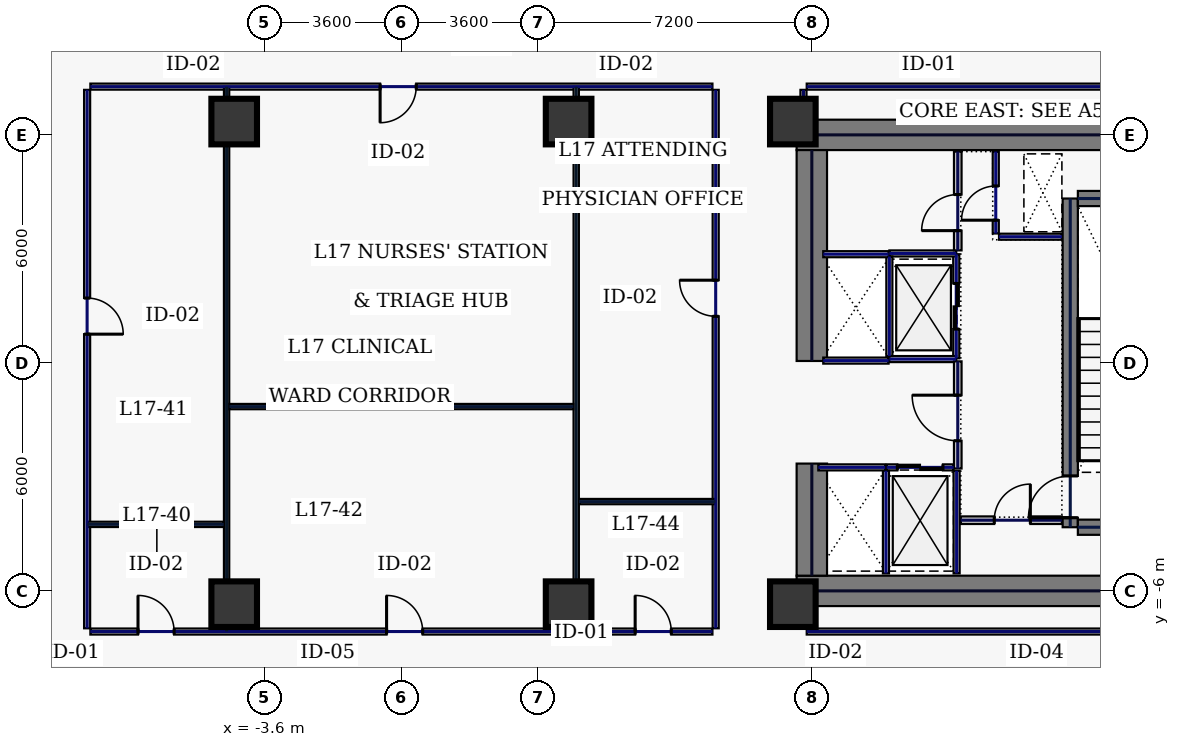
"""IFC4 building model, lengths in metres.
Left out: names, types, materials, properties, quantities, classifications, styles, units other than length and angle.
Written with IfcOpenShell. Run it as: python <this file> out.ifc"""

import sys

from ifc_helpers import new_model, si_unit, direction, frame, frame_2d, origin, origin_2d, place, context, subcontext, project, spatial, rectangle, hollow_rectangle, extrude, element, fill, save


model = new_model("IFC4")
c1 = context("Model", 3, precision=1e-05, world=origin(), true_north=direction((0.0, 1.0)))
c2 = subcontext(c1, "Body", "Model", "MODEL_VIEW")
j1 = project(units=[si_unit("LENGTHUNIT", "METRE"), si_unit("PLANEANGLEUNIT", "RADIAN")], contexts=[c1])
p1 = place(None, origin())
s1 = spatial("IfcSite", under=j1, at=p1, CompositionType="ELEMENT")
p2 = place(p1, origin())
s2 = spatial("IfcBuilding", under=s1, at=p2, CompositionType="ELEMENT")
p3 = place(p2, frame((0.0, 0.0, 79.4)))
s3 = spatial("IfcBuildingStorey", under=s2, at=p3, CompositionType="ELEMENT", Elevation=79.4)
for number, where, z_axis, x_axis in (
    (1, (10.4, 6.0, 0.0), (0.0, 0.0, 1.0), (1.0, 0.0, 0.0)),
    (2, (10.4, -6.0, 0.0), (0.0, 0.0, 1.0), (1.0, 0.0, 0.0)),
):
    element("IfcWall", number, at=place(p3, frame(where, z_axis=z_axis, x_axis=x_axis)), inside=s3, PredefinedType="SHEAR", context=c2, shape_type="SweptSolid", body=[
        extrude(rectangle(XDim=11.6, YDim=0.8, at=frame_2d((5.8, 0.0))), origin(), (0.0, 0.0, 1.0), 3.68),
    ])
p4 = place(p3, frame((10.8, -5.6, 0.0), z_axis=(0.0, 0.0, 1.0), x_axis=(0.0, 1.0, 0.0)))
e3 = element("IfcWall", 3, at=p4, inside=s3, PredefinedType="SHEAR", context=c2, shape_type="SweptSolid", body=[
    extrude(rectangle(XDim=2.95, YDim=0.8, at=frame_2d((1.475, 0.0))), origin(), (0.0, 0.0, 1.0), 3.68),
])
p5 = place(p3, frame((10.8, 0.05, 0.0), z_axis=(0.0, 0.0, 1.0), x_axis=(0.0, 1.0, 0.0)))
e4 = element("IfcWall", 4, at=p5, inside=s3, PredefinedType="SHEAR", context=c2, shape_type="SweptSolid", body=[
    extrude(rectangle(XDim=5.55, YDim=0.8, at=frame_2d((2.775, 0.0))), origin(), (0.0, 0.0, 1.0), 3.68),
])
p6 = place(p3, frame((17.6, -4.325, 0.0), z_axis=(0.0, 0.0, 1.0), x_axis=(0.0, 1.0, 0.0)))
e5 = element("IfcWall", 5, at=p6, inside=s3, PredefinedType="SHEAR", context=c2, shape_type="SweptSolid", body=[
    extrude(rectangle(XDim=8.65, YDim=0.4, at=frame_2d((4.325, 0.0))), origin(), (0.0, 0.0, 1.0), 3.68),
])
p7 = place(p6, frame((0.25, 0.0, 0.0)))
e6 = element("IfcOpeningElement", 6, at=p7, cuts=e5, PredefinedType="OPENING", context=c2, shape_type="SweptSolid", body=[
    extrude(rectangle(XDim=1.1, YDim=2.2, at=frame_2d((0.55, 1.1))), frame((0.0, 0.21, 0.0), z_axis=(0.0, -1.0, 0.0), x_axis=(1.0, 0.0, 0.0)), (0.0, 0.0, 1.0), 0.42),
])
for number, where, z_axis, x_axis in (
    (7, (17.8, -4.325, 0.0), (0.0, 0.0, 1.0), (1.0, 0.0, 0.0)),
    (8, (17.8, 4.325, 0.0), (0.0, 0.0, 1.0), (1.0, 0.0, 0.0)),
):
    element("IfcWall", number, at=place(p3, frame(where, z_axis=z_axis, x_axis=x_axis)), inside=s3, PredefinedType="SHEAR", context=c2, shape_type="SweptSolid", body=[
        extrude(rectangle(XDim=3.4, YDim=0.4, at=frame_2d((1.7, 0.0))), origin(), (0.0, 0.0, 1.0), 3.68),
    ])
for number, where, z_axis, x_axis in (
    (9, (10.3, -6.35, 0.0), (0.0, 0.0, 1.0), (1.0, 0.0, 0.0)),
    (10, (10.3, 6.35, 0.0), (0.0, 0.0, 1.0), (1.0, 0.0, 0.0)),
    (11, (-4.4, -6.35, 0.0), (0.0, 0.0, 1.0), (1.0, 0.0, 0.0)),
    (12, (4.4, -6.35, 0.0), (0.0, 0.0, 1.0), (1.0, 0.0, 0.0)),
    (13, (-4.4, 6.35, 0.0), (0.0, 0.0, 1.0), (1.0, 0.0, 0.0)),
    (14, (4.4, 6.35, 0.0), (0.0, 0.0, 1.0), (1.0, 0.0, 0.0)),
):
    element("IfcColumn", number, at=place(p3, frame(where, z_axis=z_axis, x_axis=x_axis)), inside=s3, PredefinedType="COLUMN", context=c2, shape_type="SweptSolid", body=[
        extrude(hollow_rectangle(XDim=1.2, YDim=1.2, WallThickness=0.05, at=origin_2d()), origin(), (0.0, 0.0, 1.0), 3.68),
    ])
p8 = place(p3, frame((14.6, 0.12, 0.0), z_axis=(0.0, 0.0, 1.0), x_axis=(0.0, 1.0, 0.0)))
e15 = element("IfcWall", 15, at=p8, inside=s3, PredefinedType="PARTITIONING", context=c2, shape_type="SweptSolid", body=[
    extrude(rectangle(XDim=2.74, YDim=0.16, at=frame_2d((1.37, 0.0))), origin(), (0.0, 0.0, 1.0), 3.68),
])
p9 = place(p8, frame((0.77, 0.0, 0.0)))
e16 = element("IfcOpeningElement", 16, at=p9, cuts=e15, PredefinedType="OPENING", context=c2, shape_type="SweptSolid", body=[
    extrude(rectangle(XDim=1.2, YDim=2.2, at=frame_2d((0.6, 1.1))), frame((0.0, 0.09, 0.0), z_axis=(0.0, -1.0, 0.0), x_axis=(1.0, 0.0, 0.0)), (0.0, 0.0, 1.0), 0.18),
])
for number, where, z_axis, x_axis in (
    (17, (12.84, 0.1, 0.0), (0.0, 0.0, 1.0), (1.0, 0.0, 0.0)),
    (18, (12.84, 2.88, 0.0), (0.0, 0.0, 1.0), (1.0, 0.0, 0.0)),
):
    element("IfcWall", number, at=place(p3, frame(where, z_axis=z_axis, x_axis=x_axis)), inside=s3, PredefinedType="PARTITIONING", context=c2, shape_type="SweptSolid", body=[
        extrude(rectangle(XDim=1.76, YDim=0.16, at=frame_2d((0.88, 0.0))), origin(), (0.0, 0.0, 1.0), 3.68),
    ])
p10 = place(p3, frame((12.84, 0.18, 0.0), z_axis=(0.0, 0.0, 1.0), x_axis=(0.0, 1.0, 0.0)))
e19 = element("IfcWall", 19, at=p10, inside=s3, PredefinedType="PARTITIONING", context=c2, shape_type="SweptSolid", body=[
    extrude(rectangle(XDim=2.62, YDim=0.16, at=frame_2d((1.31, 0.0))), origin(), (0.0, 0.0, 1.0), 3.68),
])
p11 = place(p3, frame((12.77, -2.75, 0.0), z_axis=(0.0, 0.0, 1.0), x_axis=(1.0, 0.0, 0.0)))
e20 = element("IfcWall", 20, at=p11, inside=s3, PredefinedType="PARTITIONING", context=c2, shape_type="SweptSolid", body=[
    extrude(rectangle(XDim=1.76, YDim=0.16, at=frame_2d((0.88, 0.0))), origin(), (0.0, 0.0, 1.0), 3.68),
])
p12 = place(p11, frame((0.28, 0.0, 0.0)))
e21 = element("IfcOpeningElement", 21, at=p12, cuts=e20, PredefinedType="OPENING", context=c2, shape_type="SweptSolid", body=[
    extrude(rectangle(XDim=1.2, YDim=2.2, at=frame_2d((0.6, 1.1))), frame((0.0, 0.09, 0.0), z_axis=(0.0, -1.0, 0.0), x_axis=(1.0, 0.0, 0.0)), (0.0, 0.0, 1.0), 0.18),
])
for number, where, z_axis, x_axis in (
    (22, (12.75, -5.54, 0.0), (0.0, 0.0, 1.0), (0.0, 1.0, 0.0)),
    (23, (14.61, -5.54, 0.0), (0.0, 0.0, 1.0), (0.0, 1.0, 0.0)),
):
    element("IfcWall", number, at=place(p3, frame(where, z_axis=z_axis, x_axis=x_axis)), inside=s3, PredefinedType="PARTITIONING", context=c2, shape_type="SweptSolid", body=[
        extrude(rectangle(XDim=2.7, YDim=0.16, at=frame_2d((1.35, 0.0))), origin(), (0.0, 0.0, 1.0), 3.68),
    ])
p13 = place(p3, frame((10.97, -2.75, 0.0), z_axis=(0.0, 0.0, 1.0), x_axis=(1.0, 0.0, 0.0)))
e24 = element("IfcWall", 24, at=p13, inside=s3, PredefinedType="PARTITIONING", context=c2, shape_type="SweptSolid", body=[
    extrude(rectangle(XDim=1.76, YDim=0.16, at=frame_2d((0.88, 0.0))), origin(), (0.0, 0.0, 1.0), 3.68),
])
for number, where, z_axis, x_axis in (
    (25, (11.1, 0.06, 0.0), (0.0, 0.0, 1.0), (1.0, 0.0, 0.0)),
    (26, (11.1, 2.86, 0.0), (0.0, 0.0, 1.0), (1.0, 0.0, 0.0)),
):
    element("IfcWall", number, at=place(p3, frame(where, z_axis=z_axis, x_axis=x_axis)), inside=s3, PredefinedType="PARTITIONING", context=c2, shape_type="SweptSolid", body=[
        extrude(rectangle(XDim=1.72, YDim=0.16, at=frame_2d((0.86, 0.0))), origin(), (0.0, 0.0, 1.0), 3.68),
    ])
p14 = place(p3, frame((15.64, 3.405, 0.0), z_axis=(0.0, 0.0, 1.0), x_axis=(0.0, 1.0, 0.0)))
e27 = element("IfcWall", 27, at=p14, inside=s3, PredefinedType="PARTITIONING", context=c2, shape_type="SweptSolid", body=[
    extrude(rectangle(XDim=2.155, YDim=0.16, at=frame_2d((1.078, 0.0))), origin(), (0.0, 0.0, 1.0), 3.68),
])
p15 = place(p14, frame((0.35, 0.0, 0.0)))
e28 = element("IfcOpeningElement", 28, at=p15, cuts=e27, PredefinedType="OPENING", context=c2, shape_type="SweptSolid", body=[
    extrude(rectangle(XDim=0.9, YDim=2.2, at=frame_2d((0.45, 1.1))), frame((0.0, 0.09, 0.0), z_axis=(0.0, -1.0, 0.0), x_axis=(1.0, 0.0, 0.0)), (0.0, 0.0, 1.0), 0.18),
])
p16 = place(p3, frame((15.725, 3.32, 0.0), z_axis=(0.0, 0.0, 1.0), x_axis=(1.0, 0.0, 0.0)))
e29 = element("IfcWall", 29, at=p16, inside=s3, PredefinedType="PARTITIONING", context=c2, shape_type="SweptSolid", body=[
    extrude(rectangle(XDim=1.655, YDim=0.16, at=frame_2d((0.827, 0.0))), origin(), (0.0, 0.0, 1.0), 3.68),
])
p17 = place(p3, frame((14.72, -4.14, 0.0), z_axis=(0.0, 0.0, 1.0), x_axis=(1.0, 0.0, 0.0)))
e30 = element("IfcWall", 30, at=p17, inside=s3, PredefinedType="SOLIDWALL", context=c2, shape_type="SweptSolid", body=[
    extrude(rectangle(XDim=2.66, YDim=0.2, at=frame_2d((1.33, 0.0))), origin(), (0.0, 0.0, 1.0), 3.68),
])
p18 = place(p17, frame((0.88, 0.0, 0.0)))
e31 = element("IfcOpeningElement", 31, at=p18, cuts=e30, PredefinedType="OPENING", context=c2, shape_type="SweptSolid", body=[
    extrude(rectangle(XDim=0.95, YDim=2.2, at=frame_2d((0.475, 1.1))), frame((0.0, 0.11, 0.0), z_axis=(0.0, -1.0, 0.0), x_axis=(1.0, 0.0, 0.0)), (0.0, 0.0, 1.0), 0.22),
])
p19 = place(p3, frame((14.64, 2.96, 0.0), z_axis=(0.0, 0.0, 1.0), x_axis=(0.0, 1.0, 0.0)))
e32 = element("IfcWall", 32, at=p19, inside=s3, PredefinedType="SOLIDWALL", context=c2, shape_type="SweptSolid", body=[
    extrude(rectangle(XDim=2.6, YDim=0.2, at=frame_2d((1.3, 0.0))), origin(), (0.0, 0.0, 1.0), 3.68),
])
p20 = place(p19, frame((0.52, 0.0, 0.0)))
e33 = element("IfcOpeningElement", 33, at=p20, cuts=e32, PredefinedType="OPENING", context=c2, shape_type="SweptSolid", body=[
    extrude(rectangle(XDim=0.95, YDim=2.2, at=frame_2d((0.475, 1.1))), frame((0.0, 0.11, 0.0), z_axis=(0.0, -1.0, 0.0), x_axis=(1.0, 0.0, 0.0)), (0.0, 0.0, 1.0), 0.22),
])
p21 = place(p3, frame((14.64, -2.78, 0.0), z_axis=(0.0, 0.0, 1.0), x_axis=(0.0, 1.0, 0.0)))
e34 = element("IfcWall", 34, at=p21, inside=s3, PredefinedType="SOLIDWALL", context=c2, shape_type="SweptSolid", body=[
    extrude(rectangle(XDim=2.82, YDim=0.2, at=frame_2d((1.41, 0.0))), origin(), (0.0, 0.0, 1.0), 3.68),
])
p22 = place(p21, frame((0.73, 0.0, 0.0)))
e35 = element("IfcOpeningElement", 35, at=p22, cuts=e34, PredefinedType="OPENING", context=c2, shape_type="SweptSolid", body=[
    extrude(rectangle(XDim=1.2, YDim=2.2, at=frame_2d((0.6, 1.1))), frame((0.0, 0.11, 0.0), z_axis=(0.0, -1.0, 0.0), x_axis=(1.0, 0.0, 0.0)), (0.0, 0.0, 1.0), 0.22),
])
p23 = place(p3, frame((27.185, 7.27, 0.0), z_axis=(0.0, 0.0, 1.0), x_axis=(-1.0, 0.0, 0.0)))
e36 = element("IfcWall", 36, at=p23, inside=s3, PredefinedType="PARTITIONING", context=c2, shape_type="SweptSolid", body=[
    extrude(rectangle(XDim=16.52, YDim=0.16, at=frame_2d((8.26, 0.0))), origin(), (0.0, 0.0, 1.0), 3.68),
])
p24 = place(p3, frame((10.58, 7.185, 0.0), z_axis=(0.0, 0.0, 1.0), x_axis=(0.0, -1.0, 0.0)))
e37 = element("IfcWall", 37, at=p24, inside=s3, PredefinedType="PARTITIONING", context=c2, shape_type="SweptSolid", body=[
    extrude(rectangle(XDim=0.765, YDim=0.16, at=frame_2d((0.383, 0.0))), origin(), (0.0, 0.0, 1.0), 1.475),
])
p25 = place(p3, frame((10.58, -6.42, 0.0), z_axis=(0.0, 0.0, 1.0), x_axis=(0.0, -1.0, 0.0)))
e38 = element("IfcWall", 38, at=p25, inside=s3, PredefinedType="PARTITIONING", context=c2, shape_type="SweptSolid", body=[
    extrude(rectangle(XDim=0.565, YDim=0.16, at=frame_2d((0.283, 0.0))), origin(), (0.0, 0.0, 1.0), 3.68),
])
p26 = place(p3, frame((10.665, -7.07, 0.0), z_axis=(0.0, 0.0, 1.0), x_axis=(1.0, 0.0, 0.0)))
e39 = element("IfcWall", 39, at=p26, inside=s3, PredefinedType="PARTITIONING", context=c2, shape_type="SweptSolid", body=[
    extrude(rectangle(XDim=16.52, YDim=0.16, at=frame_2d((8.26, 0.0))), origin(), (0.0, 0.0, 1.0), 3.68),
])
p27 = place(p3, frame((8.27, -6.985, 0.0), z_axis=(0.0, 0.0, 1.0), x_axis=(0.0, 1.0, 0.0)))
e40 = element("IfcWall", 40, at=p27, inside=s3, PredefinedType="PARTITIONING", context=c2, shape_type="SweptSolid", body=[
    extrude(rectangle(XDim=14.17, YDim=0.16, at=frame_2d((7.085, 0.0))), origin(), (0.0, 0.0, 1.0), 3.68),
])
p28 = place(p27, frame((8.211, 0.0, 0.0)))
e41 = element("IfcOpeningElement", 41, at=p28, cuts=e40, PredefinedType="OPENING", context=c2, shape_type="SweptSolid", body=[
    extrude(rectangle(XDim=0.95, YDim=2.2, at=frame_2d((0.475, 1.1))), frame((0.0, 0.09, 0.0), z_axis=(0.0, -1.0, 0.0), x_axis=(1.0, 0.0, 0.0)), (0.0, 0.0, 1.0), 0.18),
])
p29 = place(p3, frame((8.185, 7.27, 0.0), z_axis=(0.0, 0.0, 1.0), x_axis=(-1.0, 0.0, 0.0)))
e42 = element("IfcWall", 42, at=p29, inside=s3, PredefinedType="PARTITIONING", context=c2, shape_type="SweptSolid", body=[
    extrude(rectangle(XDim=16.37, YDim=0.16, at=frame_2d((8.185, 0.0))), origin(), (0.0, 0.0, 1.0), 3.68),
])
p30 = place(p29, frame((7.795, 0.0, 0.0)))
e43 = element("IfcOpeningElement", 43, at=p30, cuts=e42, PredefinedType="OPENING", context=c2, shape_type="SweptSolid", body=[
    extrude(rectangle(XDim=0.95, YDim=2.2, at=frame_2d((0.475, 1.1))), frame((0.0, 0.09, 0.0), z_axis=(0.0, -1.0, 0.0), x_axis=(1.0, 0.0, 0.0)), (0.0, 0.0, 1.0), 0.18),
])
p31 = place(p3, frame((-8.27, 7.185, 0.0), z_axis=(0.0, 0.0, 1.0), x_axis=(0.0, -1.0, 0.0)))
e44 = element("IfcWall", 44, at=p31, inside=s3, PredefinedType="PARTITIONING", context=c2, shape_type="SweptSolid", body=[
    extrude(rectangle(XDim=14.17, YDim=0.16, at=frame_2d((7.085, 0.0))), origin(), (0.0, 0.0, 1.0), 3.68),
])
p32 = place(p31, frame((5.479, 0.0, 0.0)))
e45 = element("IfcOpeningElement", 45, at=p32, cuts=e44, PredefinedType="OPENING", context=c2, shape_type="SweptSolid", body=[
    extrude(rectangle(XDim=0.95, YDim=2.2, at=frame_2d((0.475, 1.1))), frame((0.0, 0.09, 0.0), z_axis=(0.0, -1.0, 0.0), x_axis=(1.0, 0.0, 0.0)), (0.0, 0.0, 1.0), 0.18),
])
p33 = place(p3, frame((-8.185, -7.07, 0.0), z_axis=(0.0, 0.0, 1.0), x_axis=(1.0, 0.0, 0.0)))
e46 = element("IfcWall", 46, at=p33, inside=s3, PredefinedType="PARTITIONING", context=c2, shape_type="SweptSolid", body=[
    extrude(rectangle(XDim=16.37, YDim=0.16, at=frame_2d((8.185, 0.0))), origin(), (0.0, 0.0, 1.0), 3.68),
])
p34 = place(p33, frame((1.254, 0.0, 0.0)))
e47 = element("IfcOpeningElement", 47, at=p34, cuts=e46, PredefinedType="OPENING", context=c2, shape_type="SweptSolid", body=[
    extrude(rectangle(XDim=0.95, YDim=2.2, at=frame_2d((0.475, 1.1))), frame((0.0, 0.09, 0.0), z_axis=(0.0, -1.0, 0.0), x_axis=(1.0, 0.0, 0.0)), (0.0, 0.0, 1.0), 0.18),
])
p35 = place(p33, frame((7.795, 0.0, 0.0)))
e48 = element("IfcOpeningElement", 48, at=p35, cuts=e46, PredefinedType="OPENING", context=c2, shape_type="SweptSolid", body=[
    extrude(rectangle(XDim=0.95, YDim=2.2, at=frame_2d((0.475, 1.1))), frame((0.0, 0.09, 0.0), z_axis=(0.0, -1.0, 0.0), x_axis=(1.0, 0.0, 0.0)), (0.0, 0.0, 1.0), 0.18),
])
p36 = place(p33, frame((14.336, 0.0, 0.0)))
e49 = element("IfcOpeningElement", 49, at=p36, cuts=e46, PredefinedType="OPENING", context=c2, shape_type="SweptSolid", body=[
    extrude(rectangle(XDim=0.95, YDim=2.2, at=frame_2d((0.475, 1.1))), frame((0.0, 0.09, 0.0), z_axis=(0.0, -1.0, 0.0), x_axis=(1.0, 0.0, 0.0)), (0.0, 0.0, 1.0), 0.18),
])
for number, where, z_axis, x_axis in (
    (50, (-4.6, -7.065, 0.0), (0.0, 0.0, 1.0), (0.0, 1.0, 0.0)),
    (51, (4.6, -7.065, 0.0), (0.0, 0.0, 1.0), (0.0, 1.0, 0.0)),
):
    element("IfcWall", number, at=place(p3, frame(where, z_axis=z_axis, x_axis=x_axis)), inside=s3, PredefinedType="PARTITIONING", context=c2, shape_type="SweptSolid", body=[
        extrude(rectangle(XDim=14.33, YDim=0.14, at=frame_2d((7.165, 0.0))), origin(), (0.0, 0.0, 1.0), 1.475),
    ])
p37 = place(p3, frame((-4.525, -1.15, 0.0), z_axis=(0.0, 0.0, 1.0), x_axis=(1.0, 0.0, 0.0)))
e52 = element("IfcWall", 52, at=p37, inside=s3, PredefinedType="PARTITIONING", context=c2, shape_type="SweptSolid", body=[
    extrude(rectangle(XDim=9.05, YDim=0.14, at=frame_2d((4.525, 0.0))), origin(), (0.0, 0.0, 1.0), 3.68),
])
for number, where, z_axis, x_axis in (
    (53, (-8.265, -4.25, 0.0), (0.0, 0.0, 1.0), (1.0, 0.0, 0.0)),
    (54, (4.675, -3.65, 0.0), (0.0, 0.0, 1.0), (1.0, 0.0, 0.0)),
):
    element("IfcWall", number, at=place(p3, frame(where, z_axis=z_axis, x_axis=x_axis)), inside=s3, PredefinedType="PARTITIONING", context=c2, shape_type="SweptSolid", body=[
        extrude(rectangle(XDim=3.59, YDim=0.14, at=frame_2d((1.795, 0.0))), origin(), (0.0, 0.0, 1.0), 3.68),
    ])
p38 = place(p7, origin())
e55 = element("IfcDoor", 55, at=p38, inside=s3, OperationType="SINGLE_SWING_LEFT", PredefinedType="DOOR", context=c2, shape_type="SweptSolid", body=[
    extrude(rectangle(XDim=1.1, YDim=2.2, at=frame_2d((0.55, 1.1))), frame((0.0, 0.025, 0.0), z_axis=(0.0, -1.0, 0.0), x_axis=(1.0, 0.0, 0.0)), (0.0, 0.0, 1.0), 0.05),
])
fill(e6, e55)
p39 = place(p9, origin())
e56 = element("IfcDoor", 56, at=p39, inside=s3, OperationType="SLIDING_TO_LEFT", PredefinedType="DOOR", context=c2, shape_type="SweptSolid", body=[
    extrude(rectangle(XDim=1.2, YDim=2.2, at=frame_2d((0.6, 1.1))), frame((0.0, 0.025, 0.0), z_axis=(0.0, -1.0, 0.0), x_axis=(1.0, 0.0, 0.0)), (0.0, 0.0, 1.0), 0.05),
])
fill(e16, e56)
p40 = place(p12, origin())
e57 = element("IfcDoor", 57, at=p40, inside=s3, OperationType="SLIDING_TO_LEFT", PredefinedType="DOOR", context=c2, shape_type="SweptSolid", body=[
    extrude(rectangle(XDim=1.2, YDim=2.2, at=frame_2d((0.6, 1.1))), frame((0.0, 0.025, 0.0), z_axis=(0.0, -1.0, 0.0), x_axis=(1.0, 0.0, 0.0)), (0.0, 0.0, 1.0), 0.05),
])
fill(e21, e57)
p41 = place(p15, origin())
e58 = element("IfcDoor", 58, at=p41, inside=s3, OperationType="SINGLE_SWING_LEFT", PredefinedType="DOOR", context=c2, shape_type="SweptSolid", body=[
    extrude(rectangle(XDim=0.9, YDim=2.2, at=frame_2d((0.45, 1.1))), frame((0.0, 0.025, 0.0), z_axis=(0.0, -1.0, 0.0), x_axis=(1.0, 0.0, 0.0)), (0.0, 0.0, 1.0), 0.05),
])
fill(e28, e58)
p42 = place(p18, origin())
e59 = element("IfcDoor", 59, at=p42, inside=s3, OperationType="SINGLE_SWING_RIGHT", PredefinedType="DOOR", context=c2, shape_type="SweptSolid", body=[
    extrude(rectangle(XDim=0.95, YDim=2.2, at=frame_2d((0.475, 1.1))), frame((0.0, 0.025, 0.0), z_axis=(0.0, -1.0, 0.0), x_axis=(1.0, 0.0, 0.0)), (0.0, 0.0, 1.0), 0.05),
])
fill(e31, e59)
p43 = place(p20, origin())
e60 = element("IfcDoor", 60, at=p43, inside=s3, OperationType="SINGLE_SWING_LEFT", PredefinedType="DOOR", context=c2, shape_type="SweptSolid", body=[
    extrude(rectangle(XDim=0.95, YDim=2.2, at=frame_2d((0.475, 1.1))), frame((0.0, 0.025, 0.0), z_axis=(0.0, -1.0, 0.0), x_axis=(1.0, 0.0, 0.0)), (0.0, 0.0, 1.0), 0.05),
])
fill(e33, e60)
p44 = place(p22, origin())
e61 = element("IfcDoor", 61, at=p44, inside=s3, OperationType="SINGLE_SWING_RIGHT", PredefinedType="DOOR", context=c2, shape_type="SweptSolid", body=[
    extrude(rectangle(XDim=1.2, YDim=2.2, at=frame_2d((0.6, 1.1))), frame((0.0, 0.025, 0.0), z_axis=(0.0, -1.0, 0.0), x_axis=(1.0, 0.0, 0.0)), (0.0, 0.0, 1.0), 0.05),
])
fill(e35, e61)
p45 = place(p34, origin())
e62 = element("IfcDoor", 62, at=p45, inside=s3, OperationType="SINGLE_SWING_LEFT", PredefinedType="DOOR", context=c2, shape_type="SweptSolid", body=[
    extrude(rectangle(XDim=0.95, YDim=2.2, at=frame_2d((0.475, 1.1))), frame((0.0, 0.025, 0.0), z_axis=(0.0, -1.0, 0.0), x_axis=(1.0, 0.0, 0.0)), (0.0, 0.0, 1.0), 0.05),
])
fill(e47, e62)
p46 = place(p32, origin())
e63 = element("IfcDoor", 63, at=p46, inside=s3, OperationType="SINGLE_SWING_RIGHT", PredefinedType="DOOR", context=c2, shape_type="SweptSolid", body=[
    extrude(rectangle(XDim=0.95, YDim=2.2, at=frame_2d((0.475, 1.1))), frame((0.0, 0.025, 0.0), z_axis=(0.0, -1.0, 0.0), x_axis=(1.0, 0.0, 0.0)), (0.0, 0.0, 1.0), 0.05),
])
fill(e45, e63)
p47 = place(p35, origin())
e64 = element("IfcDoor", 64, at=p47, inside=s3, OperationType="SINGLE_SWING_LEFT", PredefinedType="DOOR", context=c2, shape_type="SweptSolid", body=[
    extrude(rectangle(XDim=0.95, YDim=2.2, at=frame_2d((0.475, 1.1))), frame((0.0, 0.025, 0.0), z_axis=(0.0, -1.0, 0.0), x_axis=(1.0, 0.0, 0.0)), (0.0, 0.0, 1.0), 0.05),
])
fill(e48, e64)
p48 = place(p30, origin())
e65 = element("IfcDoor", 65, at=p48, inside=s3, OperationType="SINGLE_SWING_RIGHT", PredefinedType="DOOR", context=c2, shape_type="SweptSolid", body=[
    extrude(rectangle(XDim=0.95, YDim=2.2, at=frame_2d((0.475, 1.1))), frame((0.0, 0.025, 0.0), z_axis=(0.0, -1.0, 0.0), x_axis=(1.0, 0.0, 0.0)), (0.0, 0.0, 1.0), 0.05),
])
fill(e43, e65)
p49 = place(p36, origin())
e66 = element("IfcDoor", 66, at=p49, inside=s3, OperationType="SINGLE_SWING_LEFT", PredefinedType="DOOR", context=c2, shape_type="SweptSolid", body=[
    extrude(rectangle(XDim=0.95, YDim=2.2, at=frame_2d((0.475, 1.1))), frame((0.0, 0.025, 0.0), z_axis=(0.0, -1.0, 0.0), x_axis=(1.0, 0.0, 0.0)), (0.0, 0.0, 1.0), 0.05),
])
fill(e49, e66)
p50 = place(p28, origin())
e67 = element("IfcDoor", 67, at=p50, inside=s3, OperationType="SINGLE_SWING_RIGHT", PredefinedType="DOOR", context=c2, shape_type="SweptSolid", body=[
    extrude(rectangle(XDim=0.95, YDim=2.2, at=frame_2d((0.475, 1.1))), frame((0.0, 0.025, 0.0), z_axis=(0.0, -1.0, 0.0), x_axis=(1.0, 0.0, 0.0)), (0.0, 0.0, 1.0), 0.05),
])
fill(e41, e67)
save(model, sys.argv[1])
